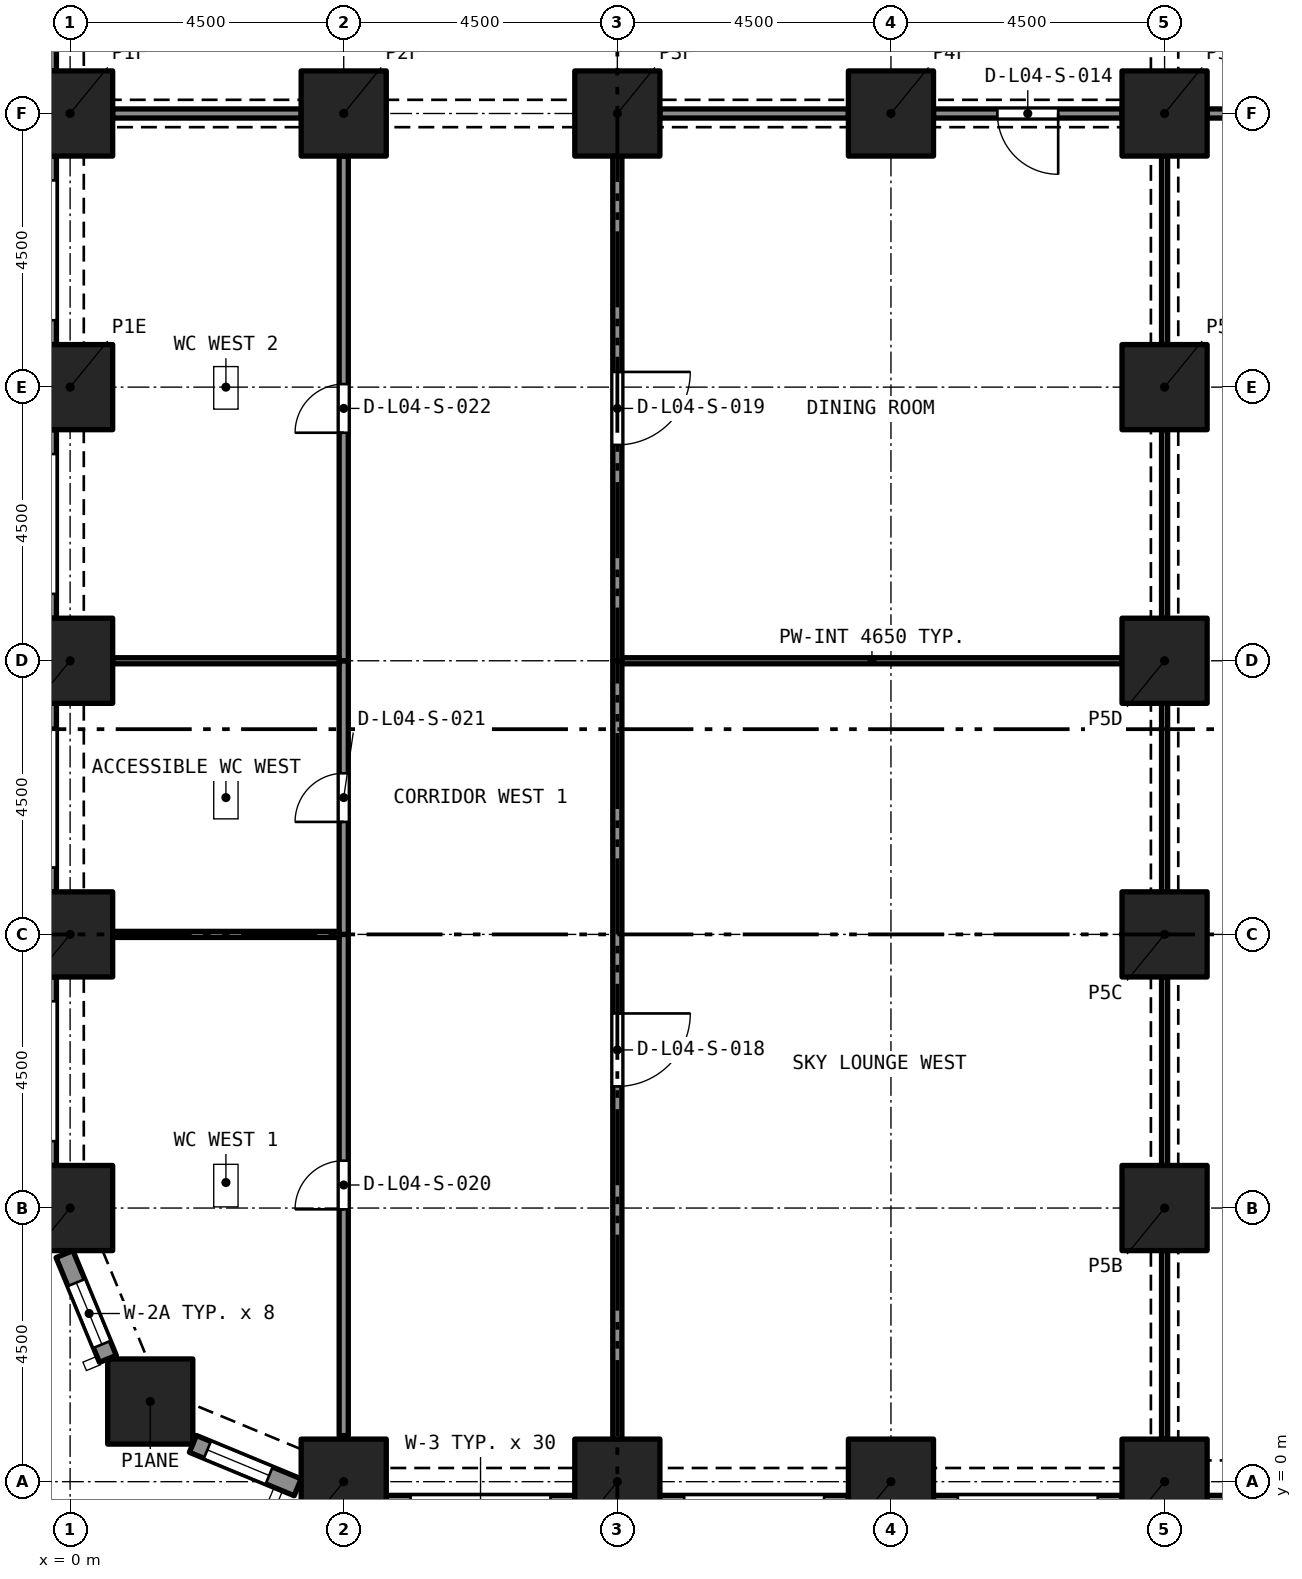
"""IFC4 building model, lengths in metres.
Left out: names, types, materials, properties, quantities, classifications, styles, units other than length and angle.
Written with IfcOpenShell. Run it as: python <this file> out.ifc"""

import sys

from ifc_helpers import new_model, si_unit, direction, frame, frame_2d, origin, origin_2d, place, context, subcontext, project, spatial, rectangle, extrude, element, fill, save


model = new_model("IFC4")
c1 = context("Model", 3, precision=1e-05, world=origin(), true_north=direction((0.0, 1.0)))
c2 = subcontext(c1, "Body", "Model", "MODEL_VIEW")
j1 = project(units=[si_unit("LENGTHUNIT", "METRE"), si_unit("PLANEANGLEUNIT", "RADIAN")], contexts=[c1])
p1 = place(None, origin())
s1 = spatial("IfcSite", under=j1, at=p1, CompositionType="ELEMENT")
p2 = place(p1, origin())
s2 = spatial("IfcBuilding", under=s1, at=p2, CompositionType="ELEMENT")
p3 = place(p2, frame((0.0, 0.0, 21.0)))
s3 = spatial("IfcBuildingStorey", under=s2, at=p3, CompositionType="ELEMENT", Elevation=21.0)
for number, where, z_axis, x_axis in (
    (1, (4.5, 0.0, 0.0), (0.0, 0.0, 1.0), (1.0, 0.0, 0.0)),
    (2, (9.0, 0.0, 0.0), (0.0, 0.0, 1.0), (1.0, 0.0, 0.0)),
    (3, (13.5, 0.0, 0.0), (0.0, 0.0, 1.0), (1.0, 0.0, 0.0)),
    (4, (18.0, 0.0, 0.0), (0.0, 0.0, 1.0), (1.0, 0.0, 0.0)),
    (5, (1.318, 1.318, 0.0), (0.0, 0.0, 1.0), (1.0, 0.0, 0.0)),
    (6, (0.0, 4.5, 0.0), (0.0, 0.0, 1.0), (1.0, 0.0, 0.0)),
    (7, (18.0, 4.5, 0.0), (0.0, 0.0, 1.0), (1.0, 0.0, 0.0)),
    (8, (0.0, 9.0, 0.0), (0.0, 0.0, 1.0), (1.0, 0.0, 0.0)),
    (9, (18.0, 9.0, 0.0), (0.0, 0.0, 1.0), (1.0, 0.0, 0.0)),
    (10, (0.0, 13.5, 0.0), (0.0, 0.0, 1.0), (1.0, 0.0, 0.0)),
    (11, (18.0, 13.5, 0.0), (0.0, 0.0, 1.0), (1.0, 0.0, 0.0)),
    (12, (0.0, 18.0, 0.0), (0.0, 0.0, 1.0), (1.0, 0.0, 0.0)),
    (13, (18.0, 18.0, 0.0), (0.0, 0.0, 1.0), (1.0, 0.0, 0.0)),
    (14, (0.0, 22.5, 0.0), (0.0, 0.0, 1.0), (1.0, 0.0, 0.0)),
    (15, (4.5, 22.5, 0.0), (0.0, 0.0, 1.0), (1.0, 0.0, 0.0)),
    (16, (9.0, 22.5, 0.0), (0.0, 0.0, 1.0), (1.0, 0.0, 0.0)),
    (17, (13.5, 22.5, 0.0), (0.0, 0.0, 1.0), (1.0, 0.0, 0.0)),
    (18, (18.0, 22.5, 0.0), (0.0, 0.0, 1.0), (1.0, 0.0, 0.0)),
):
    element("IfcColumn", number, at=place(p3, frame(where, z_axis=z_axis, x_axis=x_axis)), inside=s3, PredefinedType="COLUMN", context=c2, shape_type="SweptSolid", body=[
        extrude(rectangle(XDim=1.4, YDim=1.4, at=origin_2d()), origin(), (0.0, 0.0, 1.0), 5.0),
    ])
p4 = place(p3, frame((0.622, 2.02, 0.0), z_axis=(0.0, 0.0, 1.0), x_axis=(-0.38262540684, 0.923903565336, 0.0)))
e19 = element("IfcWall", 19, at=p4, inside=s3, PredefinedType="SOLIDWALL", context=c2, shape_type="SweptSolid", body=[
    extrude(rectangle(XDim=1.865, YDim=0.3, at=frame_2d((0.933, 0.0))), origin(), (0.0, 0.0, 1.0), 5.0),
])
p5 = place(p4, frame((0.258, 0.0, 0.45)))
e20 = element("IfcOpeningElement", 20, at=p5, cuts=e19, PredefinedType="OPENING", context=c2, shape_type="SweptSolid", body=[
    extrude(rectangle(XDim=1.1, YDim=3.3, at=frame_2d((0.55, 1.65))), frame((0.0, 0.16, 0.0), z_axis=(0.0, -1.0, 0.0), x_axis=(1.0, 0.0, 0.0)), (0.0, 0.0, 1.0), 0.32),
])
p6 = place(p3, frame((3.743, -0.092, 0.0), z_axis=(0.0, 0.0, 1.0), x_axis=(-0.923857286003, 0.382737135771, 0.0)))
e21 = element("IfcWall", 21, at=p6, inside=s3, PredefinedType="SOLIDWALL", context=c2, shape_type="SweptSolid", body=[
    extrude(rectangle(XDim=1.865, YDim=0.3, at=frame_2d((0.933, 0.0))), origin(), (0.0, 0.0, 1.0), 5.0),
])
p7 = place(p6, frame((0.508, 0.0, 0.45)))
e22 = element("IfcOpeningElement", 22, at=p7, cuts=e21, PredefinedType="OPENING", context=c2, shape_type="SweptSolid", body=[
    extrude(rectangle(XDim=1.1, YDim=3.3, at=frame_2d((0.55, 1.65))), frame((0.0, 0.16, 0.0), z_axis=(0.0, -1.0, 0.0), x_axis=(1.0, 0.0, 0.0)), (0.0, 0.0, 1.0), 0.32),
])
p8 = place(p3, frame((8.3, -0.375, 0.0), z_axis=(0.0, 0.0, 1.0), x_axis=(-1.0, 0.0, 0.0)))
e23 = element("IfcWall", 23, at=p8, inside=s3, PredefinedType="SOLIDWALL", context=c2, shape_type="SweptSolid", body=[
    extrude(rectangle(XDim=3.1, YDim=0.3, at=frame_2d((1.55, 0.0))), origin(), (0.0, 0.0, 1.0), 5.0),
])
p9 = place(p8, frame((0.4, 0.0, 0.45)))
e24 = element("IfcOpeningElement", 24, at=p9, cuts=e23, PredefinedType="OPENING", context=c2, shape_type="SweptSolid", body=[
    extrude(rectangle(XDim=2.3, YDim=3.3, at=frame_2d((1.15, 1.65))), frame((0.0, 0.16, 0.0), z_axis=(0.0, -1.0, 0.0), x_axis=(1.0, 0.0, 0.0)), (0.0, 0.0, 1.0), 0.32),
])
p10 = place(p3, frame((12.8, -0.375, 0.0), z_axis=(0.0, 0.0, 1.0), x_axis=(-1.0, 0.0, 0.0)))
e25 = element("IfcWall", 25, at=p10, inside=s3, PredefinedType="SOLIDWALL", context=c2, shape_type="SweptSolid", body=[
    extrude(rectangle(XDim=3.1, YDim=0.3, at=frame_2d((1.55, 0.0))), origin(), (0.0, 0.0, 1.0), 5.0),
])
p11 = place(p10, frame((0.4, 0.0, 0.45)))
e26 = element("IfcOpeningElement", 26, at=p11, cuts=e25, PredefinedType="OPENING", context=c2, shape_type="SweptSolid", body=[
    extrude(rectangle(XDim=2.3, YDim=3.3, at=frame_2d((1.15, 1.65))), frame((0.0, 0.16, 0.0), z_axis=(0.0, -1.0, 0.0), x_axis=(1.0, 0.0, 0.0)), (0.0, 0.0, 1.0), 0.32),
])
p12 = place(p3, frame((17.3, -0.375, 0.0), z_axis=(0.0, 0.0, 1.0), x_axis=(-1.0, 0.0, 0.0)))
e27 = element("IfcWall", 27, at=p12, inside=s3, PredefinedType="SOLIDWALL", context=c2, shape_type="SweptSolid", body=[
    extrude(rectangle(XDim=3.1, YDim=0.3, at=frame_2d((1.55, 0.0))), origin(), (0.0, 0.0, 1.0), 5.0),
])
p13 = place(p12, frame((0.4, 0.0, 0.45)))
e28 = element("IfcOpeningElement", 28, at=p13, cuts=e27, PredefinedType="OPENING", context=c2, shape_type="SweptSolid", body=[
    extrude(rectangle(XDim=2.3, YDim=3.3, at=frame_2d((1.15, 1.65))), frame((0.0, 0.16, 0.0), z_axis=(0.0, -1.0, 0.0), x_axis=(1.0, 0.0, 0.0)), (0.0, 0.0, 1.0), 0.32),
])
p14 = place(p3, frame((22.025, -0.375, 0.0), z_axis=(0.0, 0.0, 1.0), x_axis=(-1.0, 0.0, 0.0)))
e29 = element("IfcWall", 29, at=p14, inside=s3, PredefinedType="SOLIDWALL", context=c2, shape_type="SweptSolid", body=[
    extrude(rectangle(XDim=3.325, YDim=0.3, at=frame_2d((1.663, 0.0))), origin(), (0.0, 0.0, 1.0), 5.0),
])
p15 = place(p14, frame((0.575, 0.0, 0.45)))
e30 = element("IfcOpeningElement", 30, at=p15, cuts=e29, PredefinedType="OPENING", context=c2, shape_type="SweptSolid", body=[
    extrude(rectangle(XDim=2.4, YDim=3.3, at=frame_2d((1.2, 1.65))), frame((0.0, 0.16, 0.0), z_axis=(0.0, -1.0, 0.0), x_axis=(1.0, 0.0, 0.0)), (0.0, 0.0, 1.0), 0.32),
])
p16 = place(p3, frame((-0.375, 23.2, 0.0), z_axis=(0.0, 0.0, 1.0), x_axis=(0.0, 1.0, 0.0)))
e31 = element("IfcWall", 31, at=p16, inside=s3, PredefinedType="SOLIDWALL", context=c2, shape_type="SweptSolid", body=[
    extrude(rectangle(XDim=3.1, YDim=0.3, at=frame_2d((1.55, 0.0))), origin(), (0.0, 0.0, 1.0), 5.0),
])
p17 = place(p16, frame((0.4, 0.0, 0.45)))
e32 = element("IfcOpeningElement", 32, at=p17, cuts=e31, PredefinedType="OPENING", context=c2, shape_type="SweptSolid", body=[
    extrude(rectangle(XDim=2.3, YDim=3.3, at=frame_2d((1.15, 1.65))), frame((0.0, 0.16, 0.0), z_axis=(0.0, -1.0, 0.0), x_axis=(1.0, 0.0, 0.0)), (0.0, 0.0, 1.0), 0.32),
])
p18 = place(p3, frame((-0.375, 18.7, 0.0), z_axis=(0.0, 0.0, 1.0), x_axis=(0.0, 1.0, 0.0)))
e33 = element("IfcWall", 33, at=p18, inside=s3, PredefinedType="SOLIDWALL", context=c2, shape_type="SweptSolid", body=[
    extrude(rectangle(XDim=3.1, YDim=0.3, at=frame_2d((1.55, 0.0))), origin(), (0.0, 0.0, 1.0), 5.0),
])
p19 = place(p18, frame((0.4, 0.0, 0.45)))
e34 = element("IfcOpeningElement", 34, at=p19, cuts=e33, PredefinedType="OPENING", context=c2, shape_type="SweptSolid", body=[
    extrude(rectangle(XDim=2.3, YDim=3.3, at=frame_2d((1.15, 1.65))), frame((0.0, 0.16, 0.0), z_axis=(0.0, -1.0, 0.0), x_axis=(1.0, 0.0, 0.0)), (0.0, 0.0, 1.0), 0.32),
])
p20 = place(p3, frame((-0.375, 14.2, 0.0), z_axis=(0.0, 0.0, 1.0), x_axis=(0.0, 1.0, 0.0)))
e35 = element("IfcWall", 35, at=p20, inside=s3, PredefinedType="SOLIDWALL", context=c2, shape_type="SweptSolid", body=[
    extrude(rectangle(XDim=3.1, YDim=0.3, at=frame_2d((1.55, 0.0))), origin(), (0.0, 0.0, 1.0), 5.0),
])
p21 = place(p20, frame((0.4, 0.0, 0.45)))
e36 = element("IfcOpeningElement", 36, at=p21, cuts=e35, PredefinedType="OPENING", context=c2, shape_type="SweptSolid", body=[
    extrude(rectangle(XDim=2.3, YDim=3.3, at=frame_2d((1.15, 1.65))), frame((0.0, 0.16, 0.0), z_axis=(0.0, -1.0, 0.0), x_axis=(1.0, 0.0, 0.0)), (0.0, 0.0, 1.0), 0.32),
])
p22 = place(p3, frame((-0.375, 9.7, 0.0), z_axis=(0.0, 0.0, 1.0), x_axis=(0.0, 1.0, 0.0)))
e37 = element("IfcWall", 37, at=p22, inside=s3, PredefinedType="SOLIDWALL", context=c2, shape_type="SweptSolid", body=[
    extrude(rectangle(XDim=3.1, YDim=0.3, at=frame_2d((1.55, 0.0))), origin(), (0.0, 0.0, 1.0), 5.0),
])
p23 = place(p22, frame((0.4, 0.0, 0.45)))
e38 = element("IfcOpeningElement", 38, at=p23, cuts=e37, PredefinedType="OPENING", context=c2, shape_type="SweptSolid", body=[
    extrude(rectangle(XDim=2.3, YDim=3.3, at=frame_2d((1.15, 1.65))), frame((0.0, 0.16, 0.0), z_axis=(0.0, -1.0, 0.0), x_axis=(1.0, 0.0, 0.0)), (0.0, 0.0, 1.0), 0.32),
])
p24 = place(p3, frame((-0.375, 5.2, 0.0), z_axis=(0.0, 0.0, 1.0), x_axis=(0.0, 1.0, 0.0)))
e39 = element("IfcWall", 39, at=p24, inside=s3, PredefinedType="SOLIDWALL", context=c2, shape_type="SweptSolid", body=[
    extrude(rectangle(XDim=3.1, YDim=0.3, at=frame_2d((1.55, 0.0))), origin(), (0.0, 0.0, 1.0), 5.0),
])
p25 = place(p24, frame((0.4, 0.0, 0.45)))
e40 = element("IfcOpeningElement", 40, at=p25, cuts=e39, PredefinedType="OPENING", context=c2, shape_type="SweptSolid", body=[
    extrude(rectangle(XDim=2.3, YDim=3.3, at=frame_2d((1.15, 1.65))), frame((0.0, 0.16, 0.0), z_axis=(0.0, -1.0, 0.0), x_axis=(1.0, 0.0, 0.0)), (0.0, 0.0, 1.0), 0.32),
])
p26 = place(p3, frame((30.8, 22.5, 0.0), z_axis=(0.0, 0.0, 1.0), x_axis=(-1.0, 0.0, 0.0)))
e41 = element("IfcWall", 41, at=p26, inside=s3, PredefinedType="PARTITIONING", context=c2, shape_type="SweptSolid", body=[
    extrude(rectangle(XDim=12.1, YDim=0.15, at=frame_2d((6.05, 0.0))), origin(), (0.0, 0.0, 1.0), 4.55),
])
p27 = place(p26, frame((5.45, 0.0, 0.0)))
e42 = element("IfcOpeningElement", 42, at=p27, cuts=e41, PredefinedType="OPENING", context=c2, shape_type="SweptSolid", body=[
    extrude(rectangle(XDim=1.2, YDim=2.1, at=frame_2d((0.6, 1.05))), frame((0.0, 0.085, 0.0), z_axis=(0.0, -1.0, 0.0), x_axis=(1.0, 0.0, 0.0)), (0.0, 0.0, 1.0), 0.17),
])
for number, where, z_axis, x_axis in (
    (43, (18.0, 0.7, 0.0), (0.0, 0.0, 1.0), (0.0, 1.0, 0.0)),
    (44, (18.0, 5.2, 0.0), (0.0, 0.0, 1.0), (0.0, 1.0, 0.0)),
    (45, (18.0, 9.7, 0.0), (0.0, 0.0, 1.0), (0.0, 1.0, 0.0)),
    (46, (18.0, 14.2, 0.0), (0.0, 0.0, 1.0), (0.0, 1.0, 0.0)),
    (47, (18.0, 18.7, 0.0), (0.0, 0.0, 1.0), (0.0, 1.0, 0.0)),
):
    element("IfcWall", number, at=place(p3, frame(where, z_axis=z_axis, x_axis=x_axis)), inside=s3, PredefinedType="PARTITIONING", context=c2, shape_type="SweptSolid", body=[
        extrude(rectangle(XDim=3.1, YDim=0.1, at=frame_2d((1.55, 0.0))), origin(), (0.0, 0.0, 1.0), 4.18),
    ])
p28 = place(p3, frame((17.3, 22.5, 0.0), z_axis=(0.0, 0.0, 1.0), x_axis=(-1.0, 0.0, 0.0)))
e48 = element("IfcWall", 48, at=p28, inside=s3, PredefinedType="PARTITIONING", context=c2, shape_type="SweptSolid", body=[
    extrude(rectangle(XDim=3.1, YDim=0.15, at=frame_2d((1.55, 0.0))), origin(), (0.0, 0.0, 1.0), 4.18),
])
p29 = place(p28, frame((1.05, 0.0, 0.0)))
e49 = element("IfcOpeningElement", 49, at=p29, cuts=e48, PredefinedType="OPENING", context=c2, shape_type="SweptSolid", body=[
    extrude(rectangle(XDim=1.0, YDim=2.1, at=frame_2d((0.5, 1.05))), frame((0.0, 0.085, 0.0), z_axis=(0.0, -1.0, 0.0), x_axis=(1.0, 0.0, 0.0)), (0.0, 0.0, 1.0), 0.17),
])
for number, where, z_axis, x_axis in (
    (50, (9.7, 22.5, 0.0), (0.0, 0.0, 1.0), (1.0, 0.0, 0.0)),
    (51, (0.7, 22.5, 0.0), (0.0, 0.0, 1.0), (1.0, 0.0, 0.0)),
):
    element("IfcWall", number, at=place(p3, frame(where, z_axis=z_axis, x_axis=x_axis)), inside=s3, PredefinedType="PARTITIONING", context=c2, shape_type="SweptSolid", body=[
        extrude(rectangle(XDim=3.1, YDim=0.15, at=frame_2d((1.55, 0.0))), origin(), (0.0, 0.0, 1.0), 4.18),
    ])
p30 = place(p3, frame((9.075, 13.5, 0.0), z_axis=(0.0, 0.0, 1.0), x_axis=(1.0, 0.0, 0.0)))
e52 = element("IfcWall", 52, at=p30, inside=s3, PredefinedType="PARTITIONING", context=c2, shape_type="SweptSolid", body=[
    extrude(rectangle(XDim=8.225, YDim=0.1, at=frame_2d((4.113, 0.0))), origin(), (0.0, 0.0, 1.0), 4.65),
])
p31 = place(p3, frame((9.0, 13.5, 0.0), z_axis=(0.0, 0.0, 1.0), x_axis=(0.0, -1.0, 0.0)))
e53 = element("IfcWall", 53, at=p31, inside=s3, PredefinedType="PARTITIONING", context=c2, shape_type="SweptSolid", body=[
    extrude(rectangle(XDim=12.8, YDim=0.15, at=frame_2d((6.4, 0.0))), origin(), (0.0, 0.0, 1.0), 4.65),
])
p32 = place(p31, frame((5.8, 0.0, 0.0)))
e54 = element("IfcOpeningElement", 54, at=p32, cuts=e53, PredefinedType="OPENING", context=c2, shape_type="SweptSolid", body=[
    extrude(rectangle(XDim=1.2, YDim=2.1, at=frame_2d((0.6, 1.05))), frame((0.0, 0.085, 0.0), z_axis=(0.0, -1.0, 0.0), x_axis=(1.0, 0.0, 0.0)), (0.0, 0.0, 1.0), 0.17),
])
p33 = place(p3, frame((9.0, 21.8, 0.0), z_axis=(0.0, 0.0, 1.0), x_axis=(0.0, -1.0, 0.0)))
e55 = element("IfcWall", 55, at=p33, inside=s3, PredefinedType="PARTITIONING", context=c2, shape_type="SweptSolid", body=[
    extrude(rectangle(XDim=8.3, YDim=0.15, at=frame_2d((4.15, 0.0))), origin(), (0.0, 0.0, 1.0), 4.65),
])
p34 = place(p33, frame((3.55, 0.0, 0.0)))
e56 = element("IfcOpeningElement", 56, at=p34, cuts=e55, PredefinedType="OPENING", context=c2, shape_type="SweptSolid", body=[
    extrude(rectangle(XDim=1.2, YDim=2.1, at=frame_2d((0.6, 1.05))), frame((0.0, 0.085, 0.0), z_axis=(0.0, -1.0, 0.0), x_axis=(1.0, 0.0, 0.0)), (0.0, 0.0, 1.0), 0.17),
])
p35 = place(p3, frame((4.5, 0.758, 0.0), z_axis=(0.0, 0.0, 1.0), x_axis=(0.0, 1.0, 0.0)))
e57 = element("IfcWall", 57, at=p35, inside=s3, PredefinedType="PARTITIONING", context=c2, shape_type="SweptSolid", body=[
    extrude(rectangle(XDim=8.242, YDim=0.15, at=frame_2d((4.121, 0.0))), origin(), (0.0, 0.0, 1.0), 4.65),
])
p36 = place(p35, frame((3.721, 0.0, 0.0)))
e58 = element("IfcOpeningElement", 58, at=p36, cuts=e57, PredefinedType="OPENING", context=c2, shape_type="SweptSolid", body=[
    extrude(rectangle(XDim=0.8, YDim=2.1, at=frame_2d((0.4, 1.05))), frame((0.0, 0.085, 0.0), z_axis=(0.0, -1.0, 0.0), x_axis=(1.0, 0.0, 0.0)), (0.0, 0.0, 1.0), 0.17),
])
p37 = place(p3, frame((4.5, 9.0, 0.0), z_axis=(0.0, 0.0, 1.0), x_axis=(0.0, 1.0, 0.0)))
e59 = element("IfcWall", 59, at=p37, inside=s3, PredefinedType="PARTITIONING", context=c2, shape_type="SweptSolid", body=[
    extrude(rectangle(XDim=4.5, YDim=0.15, at=frame_2d((2.25, 0.0))), origin(), (0.0, 0.0, 1.0), 4.65),
])
p38 = place(p37, frame((1.85, 0.0, 0.0)))
e60 = element("IfcOpeningElement", 60, at=p38, cuts=e59, PredefinedType="OPENING", context=c2, shape_type="SweptSolid", body=[
    extrude(rectangle(XDim=0.8, YDim=2.1, at=frame_2d((0.4, 1.05))), frame((0.0, 0.085, 0.0), z_axis=(0.0, -1.0, 0.0), x_axis=(1.0, 0.0, 0.0)), (0.0, 0.0, 1.0), 0.17),
])
p39 = place(p3, frame((4.5, 13.5, 0.0), z_axis=(0.0, 0.0, 1.0), x_axis=(0.0, 1.0, 0.0)))
e61 = element("IfcWall", 61, at=p39, inside=s3, PredefinedType="PARTITIONING", context=c2, shape_type="SweptSolid", body=[
    extrude(rectangle(XDim=8.3, YDim=0.15, at=frame_2d((4.15, 0.0))), origin(), (0.0, 0.0, 1.0), 4.65),
])
p40 = place(p39, frame((3.75, 0.0, 0.0)))
e62 = element("IfcOpeningElement", 62, at=p40, cuts=e61, PredefinedType="OPENING", context=c2, shape_type="SweptSolid", body=[
    extrude(rectangle(XDim=0.8, YDim=2.1, at=frame_2d((0.4, 1.05))), frame((0.0, 0.085, 0.0), z_axis=(0.0, -1.0, 0.0), x_axis=(1.0, 0.0, 0.0)), (0.0, 0.0, 1.0), 0.17),
])
for number, where, z_axis, x_axis in (
    (63, (0.7, 9.0, 0.0), (0.0, 0.0, 1.0), (1.0, 0.0, 0.0)),
    (64, (0.7, 13.5, 0.0), (0.0, 0.0, 1.0), (1.0, 0.0, 0.0)),
):
    element("IfcWall", number, at=place(p3, frame(where, z_axis=z_axis, x_axis=x_axis)), inside=s3, PredefinedType="PARTITIONING", context=c2, shape_type="SweptSolid", body=[
        extrude(rectangle(XDim=3.725, YDim=0.1, at=frame_2d((1.863, 0.0))), origin(), (0.0, 0.0, 1.0), 4.65),
    ])
p41 = place(p5, origin())
e65 = element("IfcWindow", 65, at=p41, inside=s3, PartitioningType="SINGLE_PANEL", PredefinedType="WINDOW", context=c2, shape_type="SweptSolid", body=[
    extrude(rectangle(XDim=1.1, YDim=3.3, at=frame_2d((0.55, 1.65))), frame((0.0, 0.03, 0.0), z_axis=(0.0, -1.0, 0.0), x_axis=(1.0, 0.0, 0.0)), (0.0, 0.0, 1.0), 0.06),
])
fill(e20, e65)
p42 = place(p7, origin())
e66 = element("IfcWindow", 66, at=p42, inside=s3, PartitioningType="SINGLE_PANEL", PredefinedType="WINDOW", context=c2, shape_type="SweptSolid", body=[
    extrude(rectangle(XDim=1.1, YDim=3.3, at=frame_2d((0.55, 1.65))), frame((0.0, 0.03, 0.0), z_axis=(0.0, -1.0, 0.0), x_axis=(1.0, 0.0, 0.0)), (0.0, 0.0, 1.0), 0.06),
])
fill(e22, e66)
p43 = place(p29, origin())
e67 = element("IfcDoor", 67, at=p43, inside=s3, OperationType="SINGLE_SWING_RIGHT", PredefinedType="DOOR", context=c2, shape_type="SweptSolid", body=[
    extrude(rectangle(XDim=1.0, YDim=2.1, at=frame_2d((0.5, 1.05))), frame((0.0, 0.025, 0.0), z_axis=(0.0, -1.0, 0.0), x_axis=(1.0, 0.0, 0.0)), (0.0, 0.0, 1.0), 0.05),
])
fill(e49, e67)
p44 = place(p32, origin())
e68 = element("IfcDoor", 68, at=p44, inside=s3, OperationType="SINGLE_SWING_RIGHT", PredefinedType="DOOR", context=c2, shape_type="SweptSolid", body=[
    extrude(rectangle(XDim=1.2, YDim=2.1, at=frame_2d((0.6, 1.05))), frame((0.0, 0.025, 0.0), z_axis=(0.0, -1.0, 0.0), x_axis=(1.0, 0.0, 0.0)), (0.0, 0.0, 1.0), 0.05),
])
fill(e54, e68)
p45 = place(p34, origin())
e69 = element("IfcDoor", 69, at=p45, inside=s3, OperationType="SINGLE_SWING_RIGHT", PredefinedType="DOOR", context=c2, shape_type="SweptSolid", body=[
    extrude(rectangle(XDim=1.2, YDim=2.1, at=frame_2d((0.6, 1.05))), frame((0.0, 0.025, 0.0), z_axis=(0.0, -1.0, 0.0), x_axis=(1.0, 0.0, 0.0)), (0.0, 0.0, 1.0), 0.05),
])
fill(e56, e69)
p46 = place(p36, origin())
e70 = element("IfcDoor", 70, at=p46, inside=s3, OperationType="SINGLE_SWING_RIGHT", PredefinedType="DOOR", context=c2, shape_type="SweptSolid", body=[
    extrude(rectangle(XDim=0.8, YDim=2.1, at=frame_2d((0.4, 1.05))), frame((0.0, 0.025, 0.0), z_axis=(0.0, -1.0, 0.0), x_axis=(1.0, 0.0, 0.0)), (0.0, 0.0, 1.0), 0.05),
])
fill(e58, e70)
p47 = place(p38, origin())
e71 = element("IfcDoor", 71, at=p47, inside=s3, OperationType="SINGLE_SWING_RIGHT", PredefinedType="DOOR", context=c2, shape_type="SweptSolid", body=[
    extrude(rectangle(XDim=0.8, YDim=2.1, at=frame_2d((0.4, 1.05))), frame((0.0, 0.025, 0.0), z_axis=(0.0, -1.0, 0.0), x_axis=(1.0, 0.0, 0.0)), (0.0, 0.0, 1.0), 0.05),
])
fill(e60, e71)
p48 = place(p40, origin())
e72 = element("IfcDoor", 72, at=p48, inside=s3, OperationType="SINGLE_SWING_LEFT", PredefinedType="DOOR", context=c2, shape_type="SweptSolid", body=[
    extrude(rectangle(XDim=0.8, YDim=2.1, at=frame_2d((0.4, 1.05))), frame((0.0, 0.025, 0.0), z_axis=(0.0, -1.0, 0.0), x_axis=(1.0, 0.0, 0.0)), (0.0, 0.0, 1.0), 0.05),
])
fill(e62, e72)
save(model, sys.argv[1])
